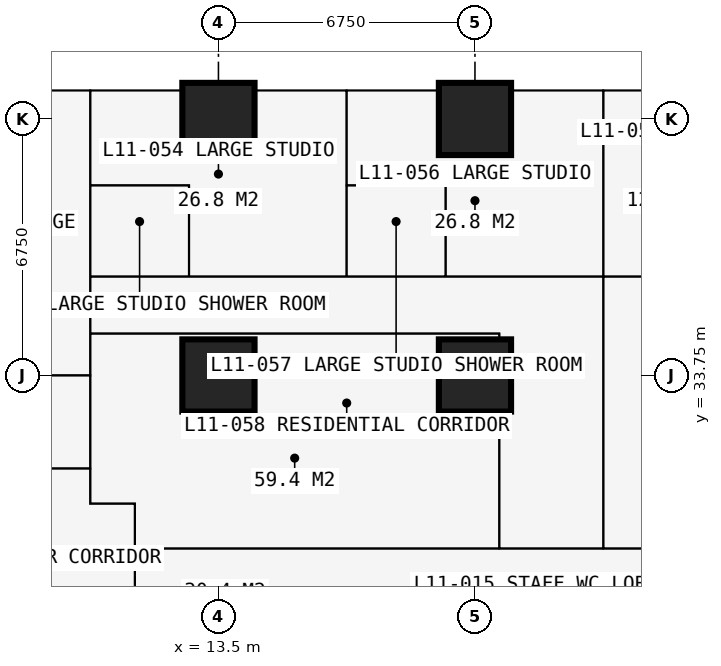
"""IFC4 building model, lengths in metres.
Left out: names, types, materials, properties, quantities, classifications, styles, units other than length and angle.
Written with IfcOpenShell. Run it as: python <this file> out.ifc"""

import sys

from ifc_helpers import new_model, si_unit, direction, frame, frame_2d, origin, origin_2d, place, context, subcontext, project, spatial, rectangle, extrude, element, fill, save


model = new_model("IFC4")
c1 = context("Model", 3, precision=1e-05, world=origin(), true_north=direction((0.0, 1.0)))
c2 = subcontext(c1, "Body", "Model", "MODEL_VIEW")
j1 = project(units=[si_unit("LENGTHUNIT", "METRE"), si_unit("PLANEANGLEUNIT", "RADIAN")], contexts=[c1])
p1 = place(None, origin())
s1 = spatial("IfcSite", under=j1, at=p1, CompositionType="ELEMENT")
p2 = place(p1, origin())
s2 = spatial("IfcBuilding", under=s1, at=p2, CompositionType="ELEMENT")
p3 = place(p2, frame((0.0, 0.0, 43.2)))
s3 = spatial("IfcBuildingStorey", under=s2, at=p3, CompositionType="ELEMENT", Elevation=43.2)
for number, where, z_axis, x_axis in (
    (1, (13.5, 33.75, 0.0), (0.0, 0.0, 1.0), (1.0, 0.0, 0.0)),
    (2, (13.5, 40.5, 0.0), (0.0, 0.0, 1.0), (1.0, 0.0, 0.0)),
    (3, (20.25, 33.75, 0.0), (0.0, 0.0, 1.0), (1.0, 0.0, 0.0)),
    (4, (20.25, 40.5, 0.0), (0.0, 0.0, 1.0), (1.0, 0.0, 0.0)),
):
    element("IfcColumn", number, at=place(p3, frame(where, z_axis=z_axis, x_axis=x_axis)), inside=s3, PredefinedType="COLUMN", context=c2, shape_type="SweptSolid", body=[
        extrude(rectangle(XDim=1.9, YDim=1.9, at=origin_2d()), origin(), (0.0, 0.0, 1.0), 3.6),
    ])
p4 = place(p3, frame((20.25, 41.25, 0.0), z_axis=(0.0, 0.0, 1.0), x_axis=(1.0, 0.0, 0.0)))
e5 = element("IfcWall", 5, at=p4, inside=s3, PredefinedType="SOLIDWALL", context=c2, shape_type="SweptSolid", body=[
    extrude(rectangle(XDim=6.75, YDim=0.15, at=frame_2d((3.375, 0.0))), origin(), (0.0, 0.0, 1.0), 3.375),
])
p5 = place(p4, frame((0.996, 0.0, 0.0)))
e6 = element("IfcOpeningElement", 6, at=p5, cuts=e5, PredefinedType="OPENING", context=c2, shape_type="SweptSolid", body=[
    extrude(rectangle(XDim=1.0, YDim=2.2, at=frame_2d((0.5, 1.1))), frame((0.0, 0.085, 0.0), z_axis=(0.0, -1.0, 0.0), x_axis=(1.0, 0.0, 0.0)), (0.0, 0.0, 1.0), 0.17),
])
p6 = place(p4, frame((2.042, 0.0, 0.9)))
e7 = element("IfcOpeningElement", 7, at=p6, cuts=e5, PredefinedType="OPENING", context=c2, shape_type="SweptSolid", body=[
    extrude(rectangle(XDim=1.2, YDim=1.8, at=frame_2d((0.6, 0.9))), frame((0.0, 0.085, 0.0), z_axis=(0.0, -1.0, 0.0), x_axis=(1.0, 0.0, 0.0)), (0.0, 0.0, 1.0), 0.17),
])
p7 = place(p4, frame((4.754, 0.0, 0.0)))
e8 = element("IfcOpeningElement", 8, at=p7, cuts=e5, PredefinedType="OPENING", context=c2, shape_type="SweptSolid", body=[
    extrude(rectangle(XDim=1.0, YDim=2.2, at=frame_2d((0.5, 1.1))), frame((0.0, 0.085, 0.0), z_axis=(0.0, -1.0, 0.0), x_axis=(1.0, 0.0, 0.0)), (0.0, 0.0, 1.0), 0.17),
])
p8 = place(p4, frame((3.508, 0.0, 0.9)))
e9 = element("IfcOpeningElement", 9, at=p8, cuts=e5, PredefinedType="OPENING", context=c2, shape_type="SweptSolid", body=[
    extrude(rectangle(XDim=1.2, YDim=1.8, at=frame_2d((0.6, 0.9))), frame((0.0, 0.085, 0.0), z_axis=(0.0, -1.0, 0.0), x_axis=(1.0, 0.0, 0.0)), (0.0, 0.0, 1.0), 0.17),
])
p9 = place(p3, frame((23.625, 41.35, 0.0), z_axis=(0.0, 0.0, 1.0), x_axis=(0.0, 1.0, 0.0)))
e10 = element("IfcWall", 10, at=p9, inside=s3, PredefinedType="USERDEFINED", context=c2, shape_type="SweptSolid", body=[
    extrude(rectangle(XDim=2.2, YDim=1.0, at=frame_2d((1.1, 0.0))), origin(), (0.0, 0.0, 1.0), 0.9),
])
p10 = place(p3, frame((-0.734, 33.75, 0.0), z_axis=(0.0, 0.0, 1.0), x_axis=(1.0, 0.0, 0.0)))
e11 = element("IfcWall", 11, at=p10, inside=s3, PredefinedType="PARTITIONING", context=c2, shape_type="SweptSolid", body=[
    extrude(rectangle(XDim=10.859, YDim=0.15, at=frame_2d((5.429, 0.0))), origin(), (0.0, 0.0, 1.0), 2.877),
])
p11 = place(p10, frame((8.434, 0.0, 0.0)))
e12 = element("IfcOpeningElement", 12, at=p11, cuts=e11, PredefinedType="OPENING", context=c2, shape_type="SweptSolid", body=[
    extrude(rectangle(XDim=1.0, YDim=2.2, at=frame_2d((0.5, 1.1))), frame((0.0, 0.085, 0.0), z_axis=(0.0, -1.0, 0.0), x_axis=(1.0, 0.0, 0.0)), (0.0, 0.0, 1.0), 0.17),
])
p12 = place(p3, frame((5.65, 31.3, 0.0), z_axis=(0.0, 0.0, 1.0), x_axis=(1.0, 0.0, 0.0)))
e13 = element("IfcWall", 13, at=p12, inside=s3, PredefinedType="PARTITIONING", context=c2, shape_type="SweptSolid", body=[
    extrude(rectangle(XDim=4.475, YDim=0.15, at=frame_2d((2.238, 0.0))), origin(), (0.0, 0.0, 1.0), 3.375),
])
p13 = place(p3, frame((10.125, 30.375, 0.0), z_axis=(0.0, 0.0, 1.0), x_axis=(0.0, 1.0, 0.0)))
e14 = element("IfcWall", 14, at=p13, inside=s3, PredefinedType="PARTITIONING", context=c2, shape_type="SweptSolid", body=[
    extrude(rectangle(XDim=10.859, YDim=0.15, at=frame_2d((5.429, 0.0))), origin(), (0.0, 0.0, 1.0), 3.375),
])
p14 = place(p3, frame((10.125, 30.375, 0.0), z_axis=(0.0, 0.0, 1.0), x_axis=(1.0, 0.0, 0.0)))
e15 = element("IfcWall", 15, at=p14, inside=s3, PredefinedType="PARTITIONING", context=c2, shape_type="SweptSolid", body=[
    extrude(rectangle(XDim=1.175, YDim=0.15, at=frame_2d((0.587, 0.0))), origin(), (0.0, 0.0, 1.0), 3.375),
])
p15 = place(p3, frame((10.125, 34.85, 0.0), z_axis=(0.0, 0.0, 1.0), x_axis=(1.0, 0.0, 0.0)))
e16 = element("IfcWall", 16, at=p15, inside=s3, PredefinedType="PARTITIONING", context=c2, shape_type="SweptSolid", body=[
    extrude(rectangle(XDim=10.762, YDim=0.15, at=frame_2d((5.381, 0.0))), origin(), (0.0, 0.0, 1.0), 3.375),
])
p16 = place(p15, frame((4.9, 0.0, 0.0)))
e17 = element("IfcOpeningElement", 17, at=p16, cuts=e16, PredefinedType="OPENING", context=c2, shape_type="SweptSolid", body=[
    extrude(rectangle(XDim=0.95, YDim=2.2, at=frame_2d((0.475, 1.1))), frame((0.0, 0.085, 0.0), z_axis=(0.0, -1.0, 0.0), x_axis=(1.0, 0.0, 0.0)), (0.0, 0.0, 1.0), 0.17),
])
p17 = place(p3, frame((10.125, 36.35, 0.0), z_axis=(0.0, 0.0, 1.0), x_axis=(1.0, 0.0, 0.0)))
e18 = element("IfcWall", 18, at=p17, inside=s3, PredefinedType="PARTITIONING", context=c2, shape_type="SweptSolid", body=[
    extrude(rectangle(XDim=23.625, YDim=0.15, at=frame_2d((11.812, 0.0))), origin(), (0.0, 0.0, 1.0), 3.375),
])
p18 = place(p17, frame((21.45, 0.0, 0.0)))
e19 = element("IfcOpeningElement", 19, at=p18, cuts=e18, PredefinedType="OPENING", context=c2, shape_type="SweptSolid", body=[
    extrude(rectangle(XDim=1.0, YDim=2.2, at=frame_2d((0.5, 1.1))), frame((0.0, 0.085, 0.0), z_axis=(0.0, -1.0, 0.0), x_axis=(1.0, 0.0, 0.0)), (0.0, 0.0, 1.0), 0.17),
])
p19 = place(p17, frame((17.125, 0.0, 0.0)))
e20 = element("IfcOpeningElement", 20, at=p19, cuts=e18, PredefinedType="OPENING", context=c2, shape_type="SweptSolid", body=[
    extrude(rectangle(XDim=0.95, YDim=2.2, at=frame_2d((0.475, 1.1))), frame((0.0, 0.085, 0.0), z_axis=(0.0, -1.0, 0.0), x_axis=(1.0, 0.0, 0.0)), (0.0, 0.0, 1.0), 0.17),
])
p20 = place(p17, frame((13.7, 0.0, 0.0)))
e21 = element("IfcOpeningElement", 21, at=p20, cuts=e18, PredefinedType="OPENING", context=c2, shape_type="SweptSolid", body=[
    extrude(rectangle(XDim=0.95, YDim=2.2, at=frame_2d((0.475, 1.1))), frame((0.0, 0.085, 0.0), z_axis=(0.0, -1.0, 0.0), x_axis=(1.0, 0.0, 0.0)), (0.0, 0.0, 1.0), 0.17),
])
p21 = place(p17, frame((4.2, 0.0, 0.0)))
e22 = element("IfcOpeningElement", 22, at=p21, cuts=e18, PredefinedType="OPENING", context=c2, shape_type="SweptSolid", body=[
    extrude(rectangle(XDim=0.95, YDim=2.2, at=frame_2d((0.475, 1.1))), frame((0.0, 0.085, 0.0), z_axis=(0.0, -1.0, 0.0), x_axis=(1.0, 0.0, 0.0)), (0.0, 0.0, 1.0), 0.17),
])
p22 = place(p17, frame((10.95, 0.0, 0.0)))
e23 = element("IfcOpeningElement", 23, at=p22, cuts=e18, PredefinedType="OPENING", context=c2, shape_type="SweptSolid", body=[
    extrude(rectangle(XDim=0.95, YDim=2.2, at=frame_2d((0.475, 1.1))), frame((0.0, 0.085, 0.0), z_axis=(0.0, -1.0, 0.0), x_axis=(1.0, 0.0, 0.0)), (0.0, 0.0, 1.0), 0.17),
])
p23 = place(p3, frame((10.125, 38.75, 0.0), z_axis=(0.0, 0.0, 1.0), x_axis=(1.0, 0.0, 0.0)))
e24 = element("IfcWall", 24, at=p23, inside=s3, PredefinedType="PARTITIONING", context=c2, shape_type="SweptSolid", body=[
    extrude(rectangle(XDim=2.6, YDim=0.1, at=frame_2d((1.3, 0.0))), origin(), (0.0, 0.0, 1.0), 3.375),
])
p24 = place(p23, frame((0.85, 0.0, 0.0)))
e25 = element("IfcOpeningElement", 25, at=p24, cuts=e24, PredefinedType="OPENING", context=c2, shape_type="SweptSolid", body=[
    extrude(rectangle(XDim=0.9, YDim=2.2, at=frame_2d((0.45, 1.1))), frame((0.0, 0.06, 0.0), z_axis=(0.0, -1.0, 0.0), x_axis=(1.0, 0.0, 0.0)), (0.0, 0.0, 1.0), 0.12),
])
p25 = place(p3, frame((11.3, 11.3, 0.0), z_axis=(0.0, 0.0, 1.0), x_axis=(0.0, 1.0, 0.0)))
e26 = element("IfcWall", 26, at=p25, inside=s3, PredefinedType="PARTITIONING", context=c2, shape_type="SweptSolid", body=[
    extrude(rectangle(XDim=19.075, YDim=0.15, at=frame_2d((9.538, 0.0))), origin(), (0.0, 0.0, 1.0), 3.375),
])
p26 = place(p25, frame((12.875, 0.0, 0.0)))
e27 = element("IfcOpeningElement", 27, at=p26, cuts=e26, PredefinedType="OPENING", context=c2, shape_type="SweptSolid", body=[
    extrude(rectangle(XDim=1.0, YDim=2.2, at=frame_2d((0.5, 1.1))), frame((0.0, 0.085, 0.0), z_axis=(0.0, -1.0, 0.0), x_axis=(1.0, 0.0, 0.0)), (0.0, 0.0, 1.0), 0.17),
])
p27 = place(p25, frame((10.438, 0.0, 0.0)))
e28 = element("IfcOpeningElement", 28, at=p27, cuts=e26, PredefinedType="OPENING", context=c2, shape_type="SweptSolid", body=[
    extrude(rectangle(XDim=1.0, YDim=2.2, at=frame_2d((0.5, 1.1))), frame((0.0, 0.085, 0.0), z_axis=(0.0, -1.0, 0.0), x_axis=(1.0, 0.0, 0.0)), (0.0, 0.0, 1.0), 0.17),
])
p28 = place(p25, frame((15.675, 0.0, 0.0)))
e29 = element("IfcOpeningElement", 29, at=p28, cuts=e26, PredefinedType="OPENING", context=c2, shape_type="SweptSolid", body=[
    extrude(rectangle(XDim=0.95, YDim=2.2, at=frame_2d((0.475, 1.1))), frame((0.0, 0.085, 0.0), z_axis=(0.0, -1.0, 0.0), x_axis=(1.0, 0.0, 0.0)), (0.0, 0.0, 1.0), 0.17),
])
p29 = place(p3, frame((11.3, 29.2, 0.0), z_axis=(0.0, 0.0, 1.0), x_axis=(1.0, 0.0, 0.0)))
e30 = element("IfcWall", 30, at=p29, inside=s3, PredefinedType="PARTITIONING", context=c2, shape_type="SweptSolid", body=[
    extrude(rectangle(XDim=19.075, YDim=0.15, at=frame_2d((9.538, 0.0))), origin(), (0.0, 0.0, 1.0), 3.375),
])
p30 = place(p29, frame((12.875, 0.0, 0.0)))
e31 = element("IfcOpeningElement", 31, at=p30, cuts=e30, PredefinedType="OPENING", context=c2, shape_type="SweptSolid", body=[
    extrude(rectangle(XDim=1.0, YDim=2.2, at=frame_2d((0.5, 1.1))), frame((0.0, 0.085, 0.0), z_axis=(0.0, -1.0, 0.0), x_axis=(1.0, 0.0, 0.0)), (0.0, 0.0, 1.0), 0.17),
])
p31 = place(p29, frame((10.438, 0.0, 0.0)))
e32 = element("IfcOpeningElement", 32, at=p31, cuts=e30, PredefinedType="OPENING", context=c2, shape_type="SweptSolid", body=[
    extrude(rectangle(XDim=1.0, YDim=2.2, at=frame_2d((0.5, 1.1))), frame((0.0, 0.085, 0.0), z_axis=(0.0, -1.0, 0.0), x_axis=(1.0, 0.0, 0.0)), (0.0, 0.0, 1.0), 0.17),
])
p32 = place(p29, frame((14.875, 0.0, 0.0)))
e33 = element("IfcOpeningElement", 33, at=p32, cuts=e30, PredefinedType="OPENING", context=c2, shape_type="SweptSolid", body=[
    extrude(rectangle(XDim=0.95, YDim=2.2, at=frame_2d((0.475, 1.1))), frame((0.0, 0.085, 0.0), z_axis=(0.0, -1.0, 0.0), x_axis=(1.0, 0.0, 0.0)), (0.0, 0.0, 1.0), 0.17),
])
p33 = place(p3, frame((12.725, 36.35, 0.0), z_axis=(0.0, 0.0, 1.0), x_axis=(0.0, 1.0, 0.0)))
e34 = element("IfcWall", 34, at=p33, inside=s3, PredefinedType="PARTITIONING", context=c2, shape_type="SweptSolid", body=[
    extrude(rectangle(XDim=2.4, YDim=0.1, at=frame_2d((1.2, 0.0))), origin(), (0.0, 0.0, 1.0), 3.375),
])
p34 = place(p3, frame((16.875, 36.35, 0.0), z_axis=(0.0, 0.0, 1.0), x_axis=(0.0, 1.0, 0.0)))
e35 = element("IfcWall", 35, at=p34, inside=s3, PredefinedType="PARTITIONING", context=c2, shape_type="SweptSolid", body=[
    extrude(rectangle(XDim=4.884, YDim=0.175, at=frame_2d((2.442, 0.0))), origin(), (0.0, 0.0, 1.0), 3.375),
])
p35 = place(p34, frame((0.75, 0.0, 0.0)))
e36 = element("IfcOpeningElement", 36, at=p35, cuts=e35, PredefinedType="OPENING", context=c2, shape_type="SweptSolid", body=[
    extrude(rectangle(XDim=0.9, YDim=2.2, at=frame_2d((0.45, 1.1))), frame((0.0, 0.097, 0.0), z_axis=(0.0, -1.0, 0.0), x_axis=(1.0, 0.0, 0.0)), (0.0, 0.0, 1.0), 0.195),
])
p36 = place(p3, frame((16.875, 38.75, 0.0), z_axis=(0.0, 0.0, 1.0), x_axis=(1.0, 0.0, 0.0)))
e37 = element("IfcWall", 37, at=p36, inside=s3, PredefinedType="PARTITIONING", context=c2, shape_type="SweptSolid", body=[
    extrude(rectangle(XDim=2.6, YDim=0.1, at=frame_2d((1.3, 0.0))), origin(), (0.0, 0.0, 1.0), 3.375),
])
p37 = place(p3, frame((19.475, 36.35, 0.0), z_axis=(0.0, 0.0, 1.0), x_axis=(0.0, 1.0, 0.0)))
e38 = element("IfcWall", 38, at=p37, inside=s3, PredefinedType="PARTITIONING", context=c2, shape_type="SweptSolid", body=[
    extrude(rectangle(XDim=2.4, YDim=0.1, at=frame_2d((1.2, 0.0))), origin(), (0.0, 0.0, 1.0), 3.375),
])
p38 = place(p3, frame((20.887, 29.2, 0.0), z_axis=(0.0, 0.0, 1.0), x_axis=(0.0, 1.0, 0.0)))
e39 = element("IfcWall", 39, at=p38, inside=s3, PredefinedType="PARTITIONING", context=c2, shape_type="SweptSolid", body=[
    extrude(rectangle(XDim=5.65, YDim=0.15, at=frame_2d((2.825, 0.0))), origin(), (0.0, 0.0, 1.0), 3.375),
])
p39 = place(p3, frame((23.625, 29.2, 0.0), z_axis=(0.0, 0.0, 1.0), x_axis=(0.0, 1.0, 0.0)))
e40 = element("IfcWall", 40, at=p39, inside=s3, PredefinedType="PARTITIONING", context=c2, shape_type="SweptSolid", body=[
    extrude(rectangle(XDim=12.034, YDim=0.15, at=frame_2d((6.017, 0.0))), origin(), (0.0, 0.0, 1.0), 3.375),
])
p40 = place(p5, origin())
e41 = element("IfcDoor", 41, at=p40, inside=s3, OperationType="SINGLE_SWING_LEFT", PredefinedType="DOOR", context=c2, shape_type="SweptSolid", body=[
    extrude(rectangle(XDim=1.0, YDim=2.2, at=frame_2d((0.5, 1.1))), frame((0.0, 0.025, 0.0), z_axis=(0.0, -1.0, 0.0), x_axis=(1.0, 0.0, 0.0)), (0.0, 0.0, 1.0), 0.05),
])
fill(e6, e41)
p41 = place(p6, origin())
e42 = element("IfcWindow", 42, at=p41, inside=s3, PartitioningType="SINGLE_PANEL", PredefinedType="WINDOW", context=c2, shape_type="SweptSolid", body=[
    extrude(rectangle(XDim=1.2, YDim=1.8, at=frame_2d((0.6, 0.9))), frame((0.0, 0.03, 0.0), z_axis=(0.0, -1.0, 0.0), x_axis=(1.0, 0.0, 0.0)), (0.0, 0.0, 1.0), 0.06),
])
fill(e7, e42)
p42 = place(p8, origin())
e43 = element("IfcWindow", 43, at=p42, inside=s3, PartitioningType="SINGLE_PANEL", PredefinedType="WINDOW", context=c2, shape_type="SweptSolid", body=[
    extrude(rectangle(XDim=1.2, YDim=1.8, at=frame_2d((0.6, 0.9))), frame((0.0, 0.03, 0.0), z_axis=(0.0, -1.0, 0.0), x_axis=(1.0, 0.0, 0.0)), (0.0, 0.0, 1.0), 0.06),
])
fill(e9, e43)
p43 = place(p20, origin())
e44 = element("IfcDoor", 44, at=p43, inside=s3, OperationType="SINGLE_SWING_LEFT", PredefinedType="DOOR", context=c2, shape_type="SweptSolid", body=[
    extrude(rectangle(XDim=0.95, YDim=2.2, at=frame_2d((0.475, 1.1))), frame((0.0, 0.025, 0.0), z_axis=(0.0, -1.0, 0.0), x_axis=(1.0, 0.0, 0.0)), (0.0, 0.0, 1.0), 0.05),
])
fill(e21, e44)
p44 = place(p30, origin())
e45 = element("IfcDoor", 45, at=p44, inside=s3, OperationType="SINGLE_SWING_LEFT", PredefinedType="DOOR", context=c2, shape_type="SweptSolid", body=[
    extrude(rectangle(XDim=1.0, YDim=2.2, at=frame_2d((0.5, 1.1))), frame((0.0, 0.025, 0.0), z_axis=(0.0, -1.0, 0.0), x_axis=(1.0, 0.0, 0.0)), (0.0, 0.0, 1.0), 0.05),
])
fill(e31, e45)
p45 = place(p21, origin())
e46 = element("IfcDoor", 46, at=p45, inside=s3, OperationType="SINGLE_SWING_LEFT", PredefinedType="DOOR", context=c2, shape_type="SweptSolid", body=[
    extrude(rectangle(XDim=0.95, YDim=2.2, at=frame_2d((0.475, 1.1))), frame((0.0, 0.025, 0.0), z_axis=(0.0, -1.0, 0.0), x_axis=(1.0, 0.0, 0.0)), (0.0, 0.0, 1.0), 0.05),
])
fill(e22, e46)
p46 = place(p24, origin())
e47 = element("IfcDoor", 47, at=p46, inside=s3, OperationType="SINGLE_SWING_RIGHT", PredefinedType="DOOR", context=c2, shape_type="SweptSolid", body=[
    extrude(rectangle(XDim=0.9, YDim=2.2, at=frame_2d((0.45, 1.1))), frame((0.0, 0.025, 0.0), z_axis=(0.0, -1.0, 0.0), x_axis=(1.0, 0.0, 0.0)), (0.0, 0.0, 1.0), 0.05),
])
fill(e25, e47)
p47 = place(p22, origin())
e48 = element("IfcDoor", 48, at=p47, inside=s3, OperationType="SINGLE_SWING_LEFT", PredefinedType="DOOR", context=c2, shape_type="SweptSolid", body=[
    extrude(rectangle(XDim=0.95, YDim=2.2, at=frame_2d((0.475, 1.1))), frame((0.0, 0.025, 0.0), z_axis=(0.0, -1.0, 0.0), x_axis=(1.0, 0.0, 0.0)), (0.0, 0.0, 1.0), 0.05),
])
fill(e23, e48)
p48 = place(p35, origin())
e49 = element("IfcDoor", 49, at=p48, inside=s3, OperationType="SINGLE_SWING_RIGHT", PredefinedType="DOOR", context=c2, shape_type="SweptSolid", body=[
    extrude(rectangle(XDim=0.9, YDim=2.2, at=frame_2d((0.45, 1.1))), frame((0.0, 0.025, 0.0), z_axis=(0.0, -1.0, 0.0), x_axis=(1.0, 0.0, 0.0)), (0.0, 0.0, 1.0), 0.05),
])
fill(e36, e49)
p49 = place(p31, origin())
e50 = element("IfcDoor", 50, at=p49, inside=s3, OperationType="SINGLE_SWING_LEFT", PredefinedType="DOOR", context=c2, shape_type="SweptSolid", body=[
    extrude(rectangle(XDim=1.0, YDim=2.2, at=frame_2d((0.5, 1.1))), frame((0.0, 0.025, 0.0), z_axis=(0.0, -1.0, 0.0), x_axis=(1.0, 0.0, 0.0)), (0.0, 0.0, 1.0), 0.05),
])
fill(e32, e50)
p50 = place(p16, origin())
e51 = element("IfcDoor", 51, at=p50, inside=s3, OperationType="SINGLE_SWING_LEFT", PredefinedType="DOOR", context=c2, shape_type="SweptSolid", body=[
    extrude(rectangle(XDim=0.95, YDim=2.2, at=frame_2d((0.475, 1.1))), frame((0.0, 0.025, 0.0), z_axis=(0.0, -1.0, 0.0), x_axis=(1.0, 0.0, 0.0)), (0.0, 0.0, 1.0), 0.05),
])
fill(e17, e51)
save(model, sys.argv[1])
